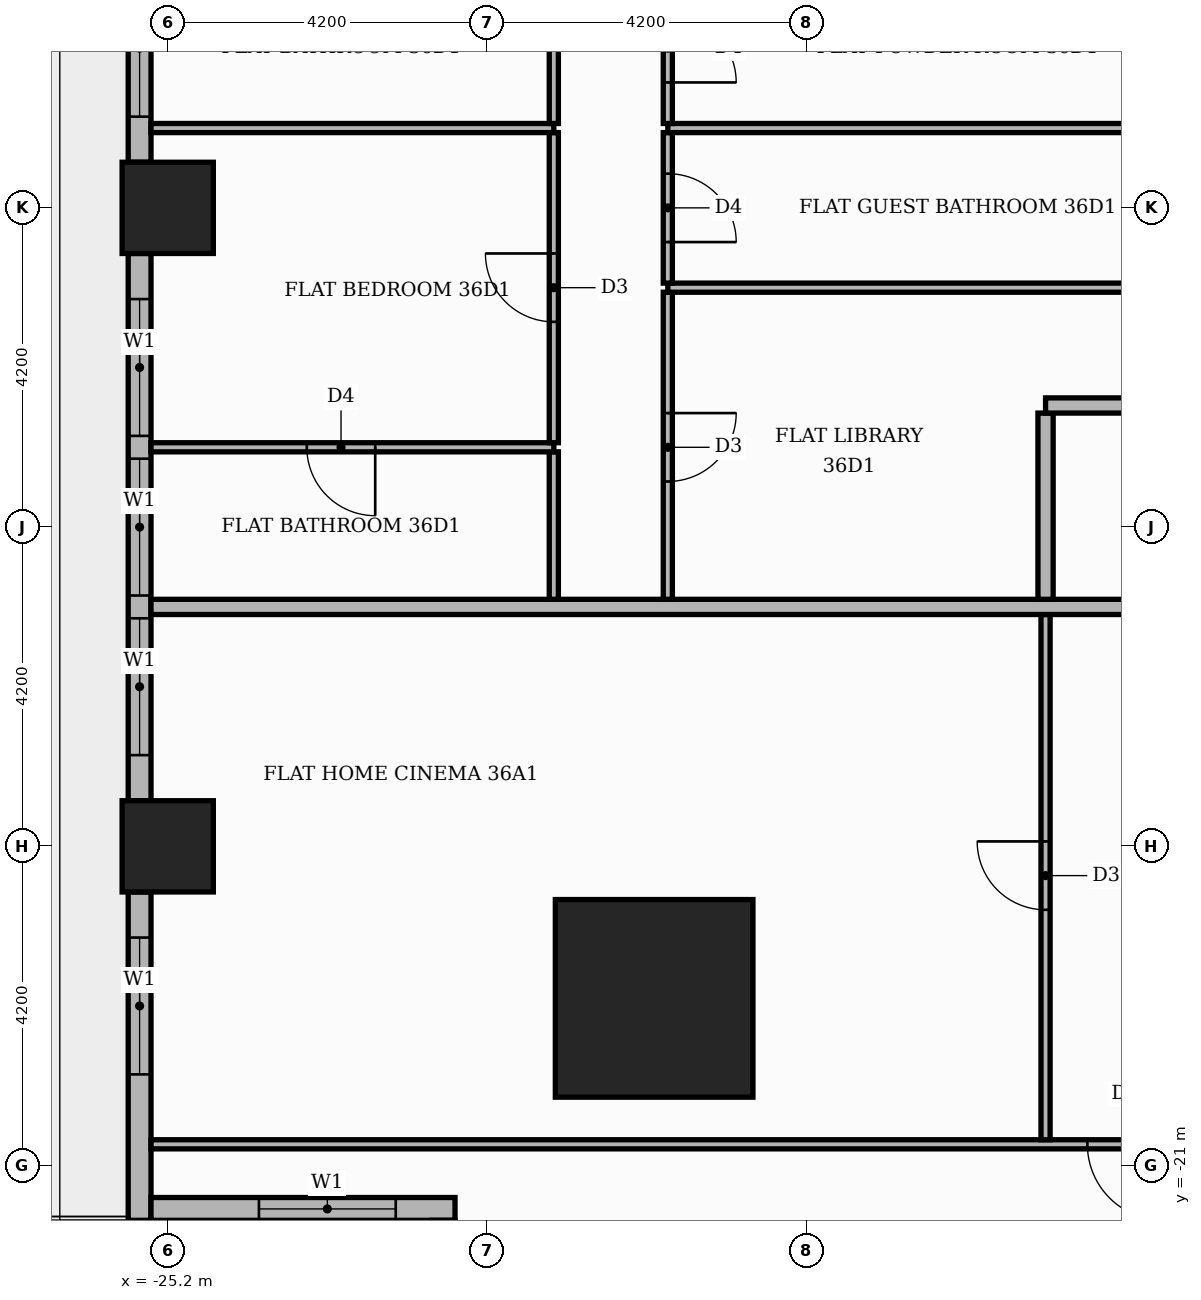
"""IFC4 building model, lengths in metres.
Left out: names, types, materials, properties, quantities, classifications, styles, units other than length and angle.
Written with IfcOpenShell. Run it as: python <this file> out.ifc"""

import sys

from ifc_helpers import new_model, si_unit, direction, frame, frame_2d, origin, origin_2d, place, context, subcontext, project, spatial, rectangle, extrude, element, fill, save


model = new_model("IFC4")
c1 = context("Model", 3, precision=1e-05, world=origin(), true_north=direction((0.0, 1.0)))
c2 = subcontext(c1, "Body", "Model", "MODEL_VIEW")
j1 = project(units=[si_unit("LENGTHUNIT", "METRE"), si_unit("PLANEANGLEUNIT", "RADIAN")], contexts=[c1])
p1 = place(None, origin())
s1 = spatial("IfcSite", under=j1, at=p1, CompositionType="ELEMENT")
p2 = place(p1, origin())
s2 = spatial("IfcBuilding", under=s1, at=p2, CompositionType="ELEMENT")
p3 = place(p2, frame((0.0, 0.0, 153.3)))
s3 = spatial("IfcBuildingStorey", under=s2, at=p3, CompositionType="ELEMENT", Elevation=153.3)
p4 = place(p3, frame((-18.8, -18.8, 0.0), z_axis=(0.0, 0.0, 1.0), x_axis=(1.0, 0.0, 0.0)))
e1 = element("IfcColumn", 1, at=p4, inside=s3, PredefinedType="COLUMN", context=c2, shape_type="SweptSolid", body=[
    extrude(rectangle(XDim=2.6, YDim=2.6, at=origin_2d()), origin(), (0.0, 0.0, 1.0), 3.9),
])
for number, where, z_axis, x_axis in (
    (2, (-25.2, -8.4, 0.0), (0.0, 0.0, 1.0), (1.0, 0.0, 0.0)),
    (3, (-25.2, -16.8, 0.0), (0.0, 0.0, 1.0), (1.0, 0.0, 0.0)),
):
    element("IfcColumn", number, at=place(p3, frame(where, z_axis=z_axis, x_axis=x_axis)), inside=s3, PredefinedType="COLUMN", context=c2, shape_type="SweptSolid", body=[
        extrude(rectangle(XDim=1.2, YDim=1.2, at=origin_2d()), origin(), (0.0, 0.0, 1.0), 3.9),
    ])
p5 = place(p3, frame((-25.57, -0.6, 0.0), z_axis=(0.0, 0.0, 1.0), x_axis=(0.0, -1.0, 0.0)))
e4 = element("IfcWall", 4, at=p5, inside=s3, PredefinedType="STANDARD", context=c2, shape_type="SweptSolid", body=[
    extrude(rectangle(XDim=7.2, YDim=0.3, at=frame_2d((3.6, 0.0))), origin(), (0.0, 0.0, 1.0), 3.48),
])
p6 = place(p5, frame((0.6, 0.0, 0.9)))
e5 = element("IfcOpeningElement", 5, at=p6, cuts=e4, PredefinedType="OPENING", context=c2, shape_type="SweptSolid", body=[
    extrude(rectangle(XDim=3.9, YDim=2.1, at=frame_2d((1.95, 1.05))), frame((0.0, 0.16, 0.0), z_axis=(0.0, -1.0, 0.0), x_axis=(1.0, 0.0, 0.0)), (0.0, 0.0, 1.0), 0.32),
])
p7 = place(p5, frame((4.8, 0.0, 0.9)))
e6 = element("IfcOpeningElement", 6, at=p7, cuts=e4, PredefinedType="OPENING", context=c2, shape_type="SweptSolid", body=[
    extrude(rectangle(XDim=1.8, YDim=2.1, at=frame_2d((0.9, 1.05))), frame((0.0, 0.16, 0.0), z_axis=(0.0, -1.0, 0.0), x_axis=(1.0, 0.0, 0.0)), (0.0, 0.0, 1.0), 0.32),
])
p8 = place(p3, frame((-25.57, -9.0, 0.0), z_axis=(0.0, 0.0, 1.0), x_axis=(0.0, -1.0, 0.0)))
e7 = element("IfcWall", 7, at=p8, inside=s3, PredefinedType="STANDARD", context=c2, shape_type="SweptSolid", body=[
    extrude(rectangle(XDim=7.2, YDim=0.3, at=frame_2d((3.6, 0.0))), origin(), (0.0, 0.0, 1.0), 3.48),
])
p9 = place(p8, frame((0.6, 0.0, 0.9)))
e8 = element("IfcOpeningElement", 8, at=p9, cuts=e7, PredefinedType="OPENING", context=c2, shape_type="SweptSolid", body=[
    extrude(rectangle(XDim=1.8, YDim=2.1, at=frame_2d((0.9, 1.05))), frame((0.0, 0.16, 0.0), z_axis=(0.0, -1.0, 0.0), x_axis=(1.0, 0.0, 0.0)), (0.0, 0.0, 1.0), 0.32),
])
p10 = place(p8, frame((2.7, 0.0, 0.9)))
e9 = element("IfcOpeningElement", 9, at=p10, cuts=e7, PredefinedType="OPENING", context=c2, shape_type="SweptSolid", body=[
    extrude(rectangle(XDim=1.8, YDim=2.1, at=frame_2d((0.9, 1.05))), frame((0.0, 0.16, 0.0), z_axis=(0.0, -1.0, 0.0), x_axis=(1.0, 0.0, 0.0)), (0.0, 0.0, 1.0), 0.32),
])
p11 = place(p8, frame((4.8, 0.0, 0.9)))
e10 = element("IfcOpeningElement", 10, at=p11, cuts=e7, PredefinedType="OPENING", context=c2, shape_type="SweptSolid", body=[
    extrude(rectangle(XDim=1.8, YDim=2.1, at=frame_2d((0.9, 1.05))), frame((0.0, 0.16, 0.0), z_axis=(0.0, -1.0, 0.0), x_axis=(1.0, 0.0, 0.0)), (0.0, 0.0, 1.0), 0.32),
])
p12 = place(p3, frame((-25.57, -17.4, 0.0), z_axis=(0.0, 0.0, 1.0), x_axis=(0.0, -1.0, 0.0)))
e11 = element("IfcWall", 11, at=p12, inside=s3, PredefinedType="STANDARD", context=c2, shape_type="SweptSolid", body=[
    extrude(rectangle(XDim=4.32, YDim=0.3, at=frame_2d((2.16, 0.0))), origin(), (0.0, 0.0, 1.0), 3.48),
])
p13 = place(p12, frame((0.6, 0.0, 0.9)))
e12 = element("IfcOpeningElement", 12, at=p13, cuts=e11, PredefinedType="OPENING", context=c2, shape_type="SweptSolid", body=[
    extrude(rectangle(XDim=1.8, YDim=2.1, at=frame_2d((0.9, 1.05))), frame((0.0, 0.16, 0.0), z_axis=(0.0, -1.0, 0.0), x_axis=(1.0, 0.0, 0.0)), (0.0, 0.0, 1.0), 0.32),
])
p14 = place(p3, frame((-25.42, -21.57, 0.0), z_axis=(0.0, 0.0, 1.0), x_axis=(1.0, 0.0, 0.0)))
e13 = element("IfcWall", 13, at=p14, inside=s3, PredefinedType="STANDARD", context=c2, shape_type="SweptSolid", body=[
    extrude(rectangle(XDim=4.0, YDim=0.3, at=frame_2d((2.0, 0.0))), origin(), (0.0, 0.0, 1.0), 3.48),
])
p15 = place(p14, frame((1.42, 0.0, 0.9)))
e14 = element("IfcOpeningElement", 14, at=p15, cuts=e13, PredefinedType="OPENING", context=c2, shape_type="SweptSolid", body=[
    extrude(rectangle(XDim=1.8, YDim=2.1, at=frame_2d((0.9, 1.05))), frame((0.0, 0.16, 0.0), z_axis=(0.0, -1.0, 0.0), x_axis=(1.0, 0.0, 0.0)), (0.0, 0.0, 1.0), 0.32),
])
p16 = place(p3, frame((-25.42, -20.72, 0.0), z_axis=(0.0, 0.0, 1.0), x_axis=(1.0, 0.0, 0.0)))
e15 = element("IfcWall", 15, at=p16, inside=s3, PredefinedType="PARTITIONING", context=c2, shape_type="SweptSolid", body=[
    extrude(rectangle(XDim=38.97, YDim=0.12, at=frame_2d((19.485, 0.0))), origin(), (0.0, 0.0, 1.0), 3.48),
])
p17 = place(p16, frame((12.32, 0.0, 0.0)))
e16 = element("IfcOpeningElement", 16, at=p17, cuts=e15, PredefinedType="OPENING", context=c2, shape_type="SweptSolid", body=[
    extrude(rectangle(XDim=1.0, YDim=2.1, at=frame_2d((0.5, 1.05))), frame((0.0, 0.07, 0.0), z_axis=(0.0, -1.0, 0.0), x_axis=(1.0, 0.0, 0.0)), (0.0, 0.0, 1.0), 0.14),
])
p18 = place(p16, frame((17.57, 0.0, 0.0)))
e17 = element("IfcOpeningElement", 17, at=p18, cuts=e15, PredefinedType="OPENING", context=c2, shape_type="SweptSolid", body=[
    extrude(rectangle(XDim=1.0, YDim=2.1, at=frame_2d((0.5, 1.05))), frame((0.0, 0.07, 0.0), z_axis=(0.0, -1.0, 0.0), x_axis=(1.0, 0.0, 0.0)), (0.0, 0.0, 1.0), 0.14),
])
p19 = place(p16, frame((24.97, 0.0, 0.0)))
e18 = element("IfcOpeningElement", 18, at=p19, cuts=e15, PredefinedType="OPENING", context=c2, shape_type="SweptSolid", body=[
    extrude(rectangle(XDim=0.9, YDim=2.1, at=frame_2d((0.45, 1.05))), frame((0.0, 0.07, 0.0), z_axis=(0.0, -1.0, 0.0), x_axis=(1.0, 0.0, 0.0)), (0.0, 0.0, 1.0), 0.14),
])
p20 = place(p16, frame((34.42, 0.0, 0.0)))
e19 = element("IfcOpeningElement", 19, at=p20, cuts=e15, PredefinedType="OPENING", context=c2, shape_type="SweptSolid", body=[
    extrude(rectangle(XDim=0.9, YDim=2.1, at=frame_2d((0.45, 1.05))), frame((0.0, 0.07, 0.0), z_axis=(0.0, -1.0, 0.0), x_axis=(1.0, 0.0, 0.0)), (0.0, 0.0, 1.0), 0.14),
])
p21 = place(p3, frame((-13.65, -20.66, 0.0), z_axis=(0.0, 0.0, 1.0), x_axis=(0.0, 1.0, 0.0)))
e20 = element("IfcWall", 20, at=p21, inside=s3, PredefinedType="PARTITIONING", context=c2, shape_type="SweptSolid", body=[
    extrude(rectangle(XDim=6.91, YDim=0.12, at=frame_2d((3.455, 0.0))), origin(), (0.0, 0.0, 1.0), 3.48),
])
p22 = place(p21, frame((3.025, 0.0, 0.0)))
e21 = element("IfcOpeningElement", 21, at=p22, cuts=e20, PredefinedType="OPENING", context=c2, shape_type="SweptSolid", body=[
    extrude(rectangle(XDim=0.9, YDim=2.1, at=frame_2d((0.45, 1.05))), frame((0.0, 0.07, 0.0), z_axis=(0.0, -1.0, 0.0), x_axis=(1.0, 0.0, 0.0)), (0.0, 0.0, 1.0), 0.14),
])
p23 = place(p3, frame((-25.42, -13.65, 0.0), z_axis=(0.0, 0.0, 1.0), x_axis=(1.0, 0.0, 0.0)))
e22 = element("IfcWall", 22, at=p23, inside=s3, PredefinedType="PARTITIONING", context=c2, shape_type="SweptSolid", body=[
    extrude(rectangle(XDim=39.07, YDim=0.2, at=frame_2d((19.535, 0.0))), origin(), (0.0, 0.0, 1.0), 3.48),
])
p24 = place(p23, frame((14.37, 0.0, 0.0)))
e23 = element("IfcOpeningElement", 23, at=p24, cuts=e22, PredefinedType="OPENING", context=c2, shape_type="SweptSolid", body=[
    extrude(rectangle(XDim=1.1, YDim=2.4, at=frame_2d((0.55, 1.2))), frame((0.0, 0.11, 0.0), z_axis=(0.0, -1.0, 0.0), x_axis=(1.0, 0.0, 0.0)), (0.0, 0.0, 1.0), 0.22),
])
p25 = place(p3, frame((-20.12, -13.55, 0.0), z_axis=(0.0, 0.0, 1.0), x_axis=(0.0, 1.0, 0.0)))
e24 = element("IfcWall", 24, at=p25, inside=s3, PredefinedType="PARTITIONING", context=c2, shape_type="SweptSolid", body=[
    extrude(rectangle(XDim=1.94, YDim=0.12, at=frame_2d((0.97, 0.0))), origin(), (0.0, 0.0, 1.0), 3.48),
])
p26 = place(p3, frame((-18.62, -13.55, 0.0), z_axis=(0.0, 0.0, 1.0), x_axis=(0.0, 1.0, 0.0)))
e25 = element("IfcWall", 25, at=p26, inside=s3, PredefinedType="PARTITIONING", context=c2, shape_type="SweptSolid", body=[
    extrude(rectangle(XDim=4.04, YDim=0.12, at=frame_2d((2.02, 0.0))), origin(), (0.0, 0.0, 1.0), 3.48),
])
p27 = place(p26, frame((1.55, 0.0, 0.0)))
e26 = element("IfcOpeningElement", 26, at=p27, cuts=e25, PredefinedType="OPENING", context=c2, shape_type="SweptSolid", body=[
    extrude(rectangle(XDim=0.9, YDim=2.1, at=frame_2d((0.45, 1.05))), frame((0.0, 0.07, 0.0), z_axis=(0.0, -1.0, 0.0), x_axis=(1.0, 0.0, 0.0)), (0.0, 0.0, 1.0), 0.14),
])
p28 = place(p3, frame((-13.65, -13.55, 0.0), z_axis=(0.0, 0.0, 1.0), x_axis=(0.0, 1.0, 0.0)))
e27 = element("IfcWall", 27, at=p28, inside=s3, PredefinedType="PARTITIONING", context=c2, shape_type="SweptSolid", body=[
    extrude(rectangle(XDim=2.45, YDim=0.2, at=frame_2d((1.225, 0.0))), origin(), (0.0, 0.0, 1.0), 3.48),
])
p29 = place(p3, frame((-25.42, -11.55, 0.0), z_axis=(0.0, 0.0, 1.0), x_axis=(1.0, 0.0, 0.0)))
e28 = element("IfcWall", 28, at=p29, inside=s3, PredefinedType="PARTITIONING", context=c2, shape_type="SweptSolid", body=[
    extrude(rectangle(XDim=5.3, YDim=0.12, at=frame_2d((2.65, 0.0))), origin(), (0.0, 0.0, 1.0), 3.48),
])
p30 = place(p29, frame((2.05, 0.0, 0.0)))
e29 = element("IfcOpeningElement", 29, at=p30, cuts=e28, PredefinedType="OPENING", context=c2, shape_type="SweptSolid", body=[
    extrude(rectangle(XDim=0.9, YDim=2.1, at=frame_2d((0.45, 1.05))), frame((0.0, 0.07, 0.0), z_axis=(0.0, -1.0, 0.0), x_axis=(1.0, 0.0, 0.0)), (0.0, 0.0, 1.0), 0.14),
])
p31 = place(p3, frame((-20.12, -11.49, 0.0), z_axis=(0.0, 0.0, 1.0), x_axis=(0.0, 1.0, 0.0)))
e30 = element("IfcWall", 30, at=p31, inside=s3, PredefinedType="PARTITIONING", context=c2, shape_type="SweptSolid", body=[
    extrude(rectangle(XDim=4.08, YDim=0.12, at=frame_2d((2.04, 0.0))), origin(), (0.0, 0.0, 1.0), 3.48),
])
p32 = place(p31, frame((1.59, 0.0, 0.0)))
e31 = element("IfcOpeningElement", 31, at=p32, cuts=e30, PredefinedType="OPENING", context=c2, shape_type="SweptSolid", body=[
    extrude(rectangle(XDim=0.9, YDim=2.1, at=frame_2d((0.45, 1.05))), frame((0.0, 0.07, 0.0), z_axis=(0.0, -1.0, 0.0), x_axis=(1.0, 0.0, 0.0)), (0.0, 0.0, 1.0), 0.14),
])
p33 = place(p3, frame((-13.65, -11.0, 0.0), z_axis=(0.0, 0.0, 1.0), x_axis=(1.0, 0.0, 0.0)))
e32 = element("IfcWall", 32, at=p33, inside=s3, PredefinedType="PARTITIONING", context=c2, shape_type="SweptSolid", body=[
    extrude(rectangle(XDim=2.65, YDim=0.2, at=frame_2d((1.325, 0.0))), origin(), (0.0, 0.0, 1.0), 3.48),
])
p34 = place(p3, frame((-18.62, -9.45, 0.0), z_axis=(0.0, 0.0, 1.0), x_axis=(1.0, 0.0, 0.0)))
e33 = element("IfcWall", 33, at=p34, inside=s3, PredefinedType="PARTITIONING", context=c2, shape_type="SweptSolid", body=[
    extrude(rectangle(XDim=7.62, YDim=0.12, at=frame_2d((3.81, 0.0))), origin(), (0.0, 0.0, 1.0), 3.48),
])
p35 = place(p3, frame((-18.62, -9.39, 0.0), z_axis=(0.0, 0.0, 1.0), x_axis=(0.0, 1.0, 0.0)))
e34 = element("IfcWall", 34, at=p35, inside=s3, PredefinedType="PARTITIONING", context=c2, shape_type="SweptSolid", body=[
    extrude(rectangle(XDim=1.98, YDim=0.12, at=frame_2d((0.99, 0.0))), origin(), (0.0, 0.0, 1.0), 3.48),
])
p36 = place(p35, frame((0.54, 0.0, 0.0)))
e35 = element("IfcOpeningElement", 35, at=p36, cuts=e34, PredefinedType="OPENING", context=c2, shape_type="SweptSolid", body=[
    extrude(rectangle(XDim=0.9, YDim=2.1, at=frame_2d((0.45, 1.05))), frame((0.0, 0.07, 0.0), z_axis=(0.0, -1.0, 0.0), x_axis=(1.0, 0.0, 0.0)), (0.0, 0.0, 1.0), 0.14),
])
p37 = place(p3, frame((-25.42, -7.35, 0.0), z_axis=(0.0, 0.0, 1.0), x_axis=(1.0, 0.0, 0.0)))
e36 = element("IfcWall", 36, at=p37, inside=s3, PredefinedType="PARTITIONING", context=c2, shape_type="SweptSolid", body=[
    extrude(rectangle(XDim=5.3, YDim=0.12, at=frame_2d((2.65, 0.0))), origin(), (0.0, 0.0, 1.0), 3.48),
])
p38 = place(p3, frame((-18.62, -7.35, 0.0), z_axis=(0.0, 0.0, 1.0), x_axis=(1.0, 0.0, 0.0)))
e37 = element("IfcWall", 37, at=p38, inside=s3, PredefinedType="PARTITIONING", context=c2, shape_type="SweptSolid", body=[
    extrude(rectangle(XDim=7.62, YDim=0.12, at=frame_2d((3.81, 0.0))), origin(), (0.0, 0.0, 1.0), 3.48),
])
p39 = place(p3, frame((-20.12, -7.29, 0.0), z_axis=(0.0, 0.0, 1.0), x_axis=(0.0, 1.0, 0.0)))
e38 = element("IfcWall", 38, at=p39, inside=s3, PredefinedType="PARTITIONING", context=c2, shape_type="SweptSolid", body=[
    extrude(rectangle(XDim=1.98, YDim=0.12, at=frame_2d((0.99, 0.0))), origin(), (0.0, 0.0, 1.0), 3.48),
])
p40 = place(p3, frame((-18.62, -7.29, 0.0), z_axis=(0.0, 0.0, 1.0), x_axis=(0.0, 1.0, 0.0)))
e39 = element("IfcWall", 39, at=p40, inside=s3, PredefinedType="PARTITIONING", context=c2, shape_type="SweptSolid", body=[
    extrude(rectangle(XDim=1.98, YDim=0.12, at=frame_2d((0.99, 0.0))), origin(), (0.0, 0.0, 1.0), 3.48),
])
p41 = place(p40, frame((0.54, 0.0, 0.0)))
e40 = element("IfcOpeningElement", 40, at=p41, cuts=e39, PredefinedType="OPENING", context=c2, shape_type="SweptSolid", body=[
    extrude(rectangle(XDim=0.9, YDim=2.1, at=frame_2d((0.45, 1.05))), frame((0.0, 0.07, 0.0), z_axis=(0.0, -1.0, 0.0), x_axis=(1.0, 0.0, 0.0)), (0.0, 0.0, 1.0), 0.14),
])
p42 = place(p7, origin())
e41 = element("IfcWindow", 41, at=p42, inside=s3, PartitioningType="SINGLE_PANEL", PredefinedType="WINDOW", context=c2, shape_type="SweptSolid", body=[
    extrude(rectangle(XDim=1.8, YDim=2.1, at=frame_2d((0.9, 1.05))), frame((0.0, 0.03, 0.0), z_axis=(0.0, -1.0, 0.0), x_axis=(1.0, 0.0, 0.0)), (0.0, 0.0, 1.0), 0.06),
])
fill(e6, e41)
p43 = place(p9, origin())
e42 = element("IfcWindow", 42, at=p43, inside=s3, PartitioningType="SINGLE_PANEL", PredefinedType="WINDOW", context=c2, shape_type="SweptSolid", body=[
    extrude(rectangle(XDim=1.8, YDim=2.1, at=frame_2d((0.9, 1.05))), frame((0.0, 0.03, 0.0), z_axis=(0.0, -1.0, 0.0), x_axis=(1.0, 0.0, 0.0)), (0.0, 0.0, 1.0), 0.06),
])
fill(e8, e42)
p44 = place(p10, origin())
e43 = element("IfcWindow", 43, at=p44, inside=s3, PartitioningType="SINGLE_PANEL", PredefinedType="WINDOW", context=c2, shape_type="SweptSolid", body=[
    extrude(rectangle(XDim=1.8, YDim=2.1, at=frame_2d((0.9, 1.05))), frame((0.0, 0.03, 0.0), z_axis=(0.0, -1.0, 0.0), x_axis=(1.0, 0.0, 0.0)), (0.0, 0.0, 1.0), 0.06),
])
fill(e9, e43)
p45 = place(p11, origin())
e44 = element("IfcWindow", 44, at=p45, inside=s3, PartitioningType="SINGLE_PANEL", PredefinedType="WINDOW", context=c2, shape_type="SweptSolid", body=[
    extrude(rectangle(XDim=1.8, YDim=2.1, at=frame_2d((0.9, 1.05))), frame((0.0, 0.03, 0.0), z_axis=(0.0, -1.0, 0.0), x_axis=(1.0, 0.0, 0.0)), (0.0, 0.0, 1.0), 0.06),
])
fill(e10, e44)
p46 = place(p13, origin())
e45 = element("IfcWindow", 45, at=p46, inside=s3, PartitioningType="SINGLE_PANEL", PredefinedType="WINDOW", context=c2, shape_type="SweptSolid", body=[
    extrude(rectangle(XDim=1.8, YDim=2.1, at=frame_2d((0.9, 1.05))), frame((0.0, 0.03, 0.0), z_axis=(0.0, -1.0, 0.0), x_axis=(1.0, 0.0, 0.0)), (0.0, 0.0, 1.0), 0.06),
])
fill(e12, e45)
p47 = place(p15, origin())
e46 = element("IfcWindow", 46, at=p47, inside=s3, PartitioningType="SINGLE_PANEL", PredefinedType="WINDOW", context=c2, shape_type="SweptSolid", body=[
    extrude(rectangle(XDim=1.8, YDim=2.1, at=frame_2d((0.9, 1.05))), frame((0.0, 0.03, 0.0), z_axis=(0.0, -1.0, 0.0), x_axis=(1.0, 0.0, 0.0)), (0.0, 0.0, 1.0), 0.06),
])
fill(e14, e46)
p48 = place(p22, origin())
e47 = element("IfcDoor", 47, at=p48, inside=s3, OperationType="SINGLE_SWING_RIGHT", PredefinedType="DOOR", context=c2, shape_type="SweptSolid", body=[
    extrude(rectangle(XDim=0.9, YDim=2.1, at=frame_2d((0.45, 1.05))), frame((0.0, 0.025, 0.0), z_axis=(0.0, -1.0, 0.0), x_axis=(1.0, 0.0, 0.0)), (0.0, 0.0, 1.0), 0.05),
])
fill(e21, e47)
p49 = place(p17, frame((1.0, 0.0, 0.0), z_axis=(0.0, 0.0, 1.0), x_axis=(-1.0, 0.0, 0.0)))
e48 = element("IfcDoor", 48, at=p49, inside=s3, OperationType="SINGLE_SWING_RIGHT", PredefinedType="DOOR", context=c2, shape_type="SweptSolid", body=[
    extrude(rectangle(XDim=1.0, YDim=2.1, at=frame_2d((0.5, 1.05))), frame((0.0, 0.025, 0.0), z_axis=(0.0, -1.0, 0.0), x_axis=(1.0, 0.0, 0.0)), (0.0, 0.0, 1.0), 0.05),
])
fill(e16, e48)
p50 = place(p41, frame((0.9, 0.0, 0.0), z_axis=(0.0, 0.0, 1.0), x_axis=(-1.0, 0.0, 0.0)))
e49 = element("IfcDoor", 49, at=p50, inside=s3, OperationType="SINGLE_SWING_LEFT", PredefinedType="DOOR", context=c2, shape_type="SweptSolid", body=[
    extrude(rectangle(XDim=0.9, YDim=2.1, at=frame_2d((0.45, 1.05))), frame((0.0, 0.025, 0.0), z_axis=(0.0, -1.0, 0.0), x_axis=(1.0, 0.0, 0.0)), (0.0, 0.0, 1.0), 0.05),
])
fill(e40, e49)
p51 = place(p36, frame((0.9, 0.0, 0.0), z_axis=(0.0, 0.0, 1.0), x_axis=(-1.0, 0.0, 0.0)))
e50 = element("IfcDoor", 50, at=p51, inside=s3, OperationType="SINGLE_SWING_LEFT", PredefinedType="DOOR", context=c2, shape_type="SweptSolid", body=[
    extrude(rectangle(XDim=0.9, YDim=2.1, at=frame_2d((0.45, 1.05))), frame((0.0, 0.025, 0.0), z_axis=(0.0, -1.0, 0.0), x_axis=(1.0, 0.0, 0.0)), (0.0, 0.0, 1.0), 0.05),
])
fill(e35, e50)
p52 = place(p27, frame((0.9, 0.0, 0.0), z_axis=(0.0, 0.0, 1.0), x_axis=(-1.0, 0.0, 0.0)))
e51 = element("IfcDoor", 51, at=p52, inside=s3, OperationType="SINGLE_SWING_RIGHT", PredefinedType="DOOR", context=c2, shape_type="SweptSolid", body=[
    extrude(rectangle(XDim=0.9, YDim=2.1, at=frame_2d((0.45, 1.05))), frame((0.0, 0.025, 0.0), z_axis=(0.0, -1.0, 0.0), x_axis=(1.0, 0.0, 0.0)), (0.0, 0.0, 1.0), 0.05),
])
fill(e26, e51)
p53 = place(p32, origin())
e52 = element("IfcDoor", 52, at=p53, inside=s3, OperationType="SINGLE_SWING_RIGHT", PredefinedType="DOOR", context=c2, shape_type="SweptSolid", body=[
    extrude(rectangle(XDim=0.9, YDim=2.1, at=frame_2d((0.45, 1.05))), frame((0.0, 0.025, 0.0), z_axis=(0.0, -1.0, 0.0), x_axis=(1.0, 0.0, 0.0)), (0.0, 0.0, 1.0), 0.05),
])
fill(e31, e52)
p54 = place(p30, frame((0.9, 0.0, 0.0), z_axis=(0.0, 0.0, 1.0), x_axis=(-1.0, 0.0, 0.0)))
e53 = element("IfcDoor", 53, at=p54, inside=s3, OperationType="SINGLE_SWING_RIGHT", PredefinedType="DOOR", context=c2, shape_type="SweptSolid", body=[
    extrude(rectangle(XDim=0.9, YDim=2.1, at=frame_2d((0.45, 1.05))), frame((0.0, 0.025, 0.0), z_axis=(0.0, -1.0, 0.0), x_axis=(1.0, 0.0, 0.0)), (0.0, 0.0, 1.0), 0.05),
])
fill(e29, e53)
save(model, sys.argv[1])
